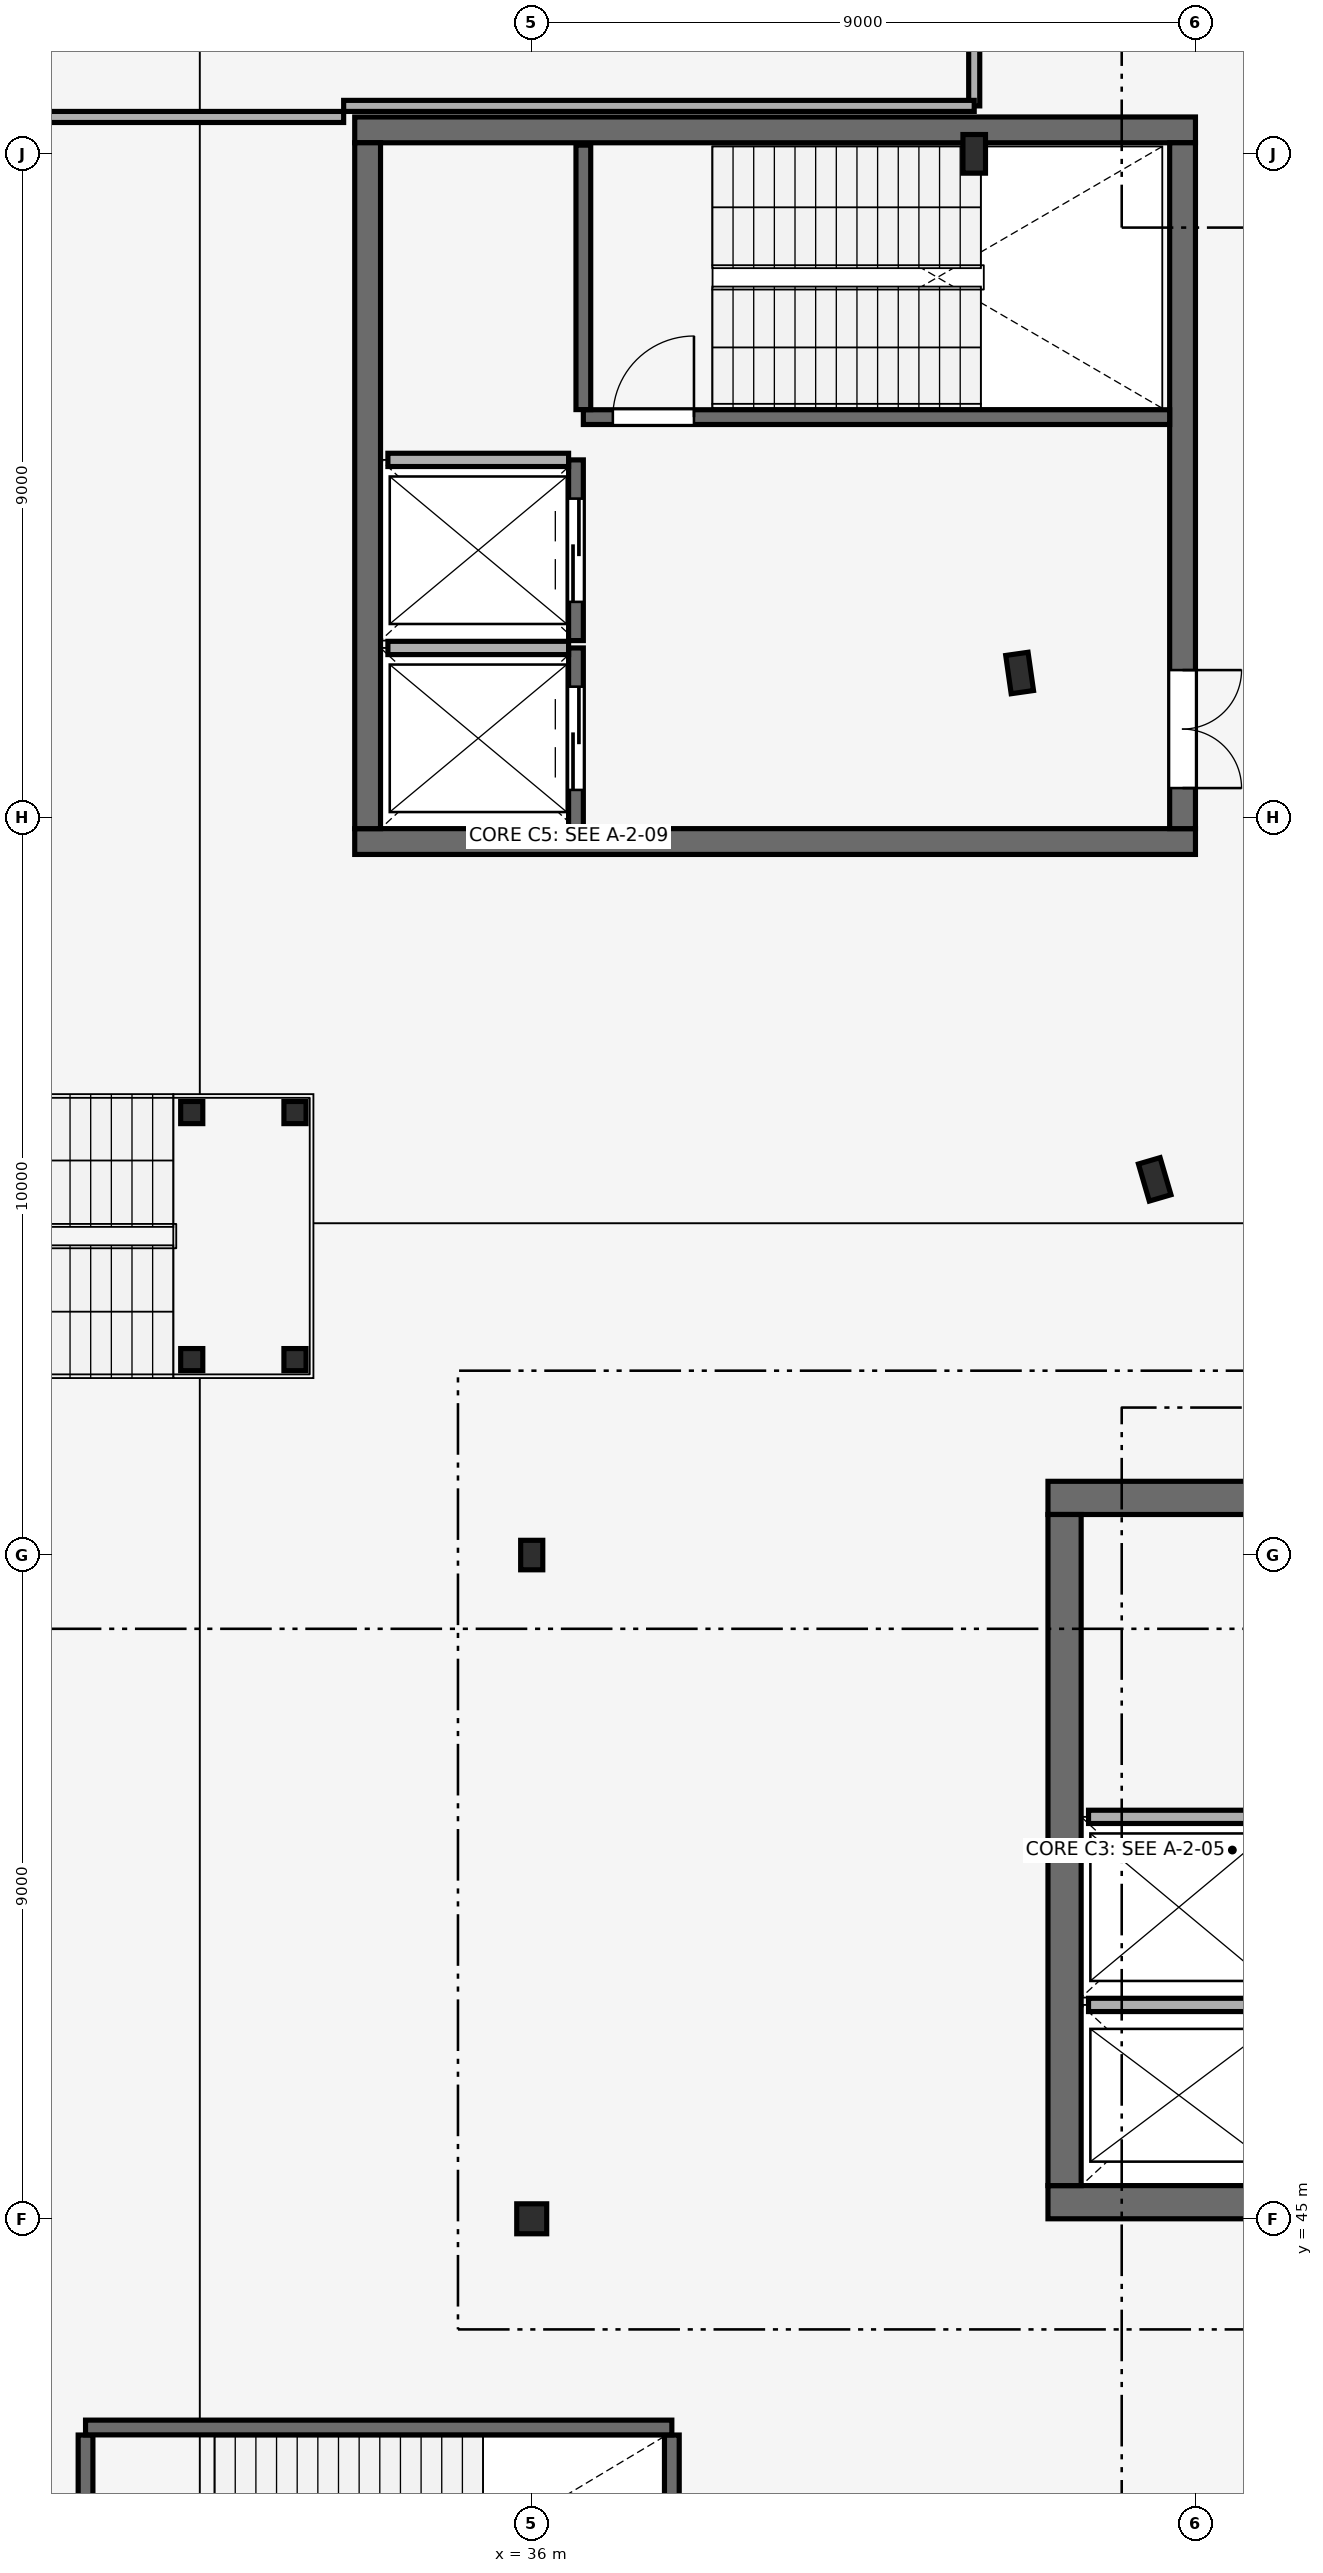
"""IFC4 building model, lengths in metres.
Left out: names, types, materials, properties, quantities, classifications, styles, units other than length and angle.
Written with IfcOpenShell. Run it as: python <this file> out.ifc"""

import sys

from ifc_helpers import new_model, si_unit, direction, frame, frame_2d, origin, origin_2d, place, context, subcontext, project, spatial, rectangle, hollow_rectangle, hollow_circle, i_section, extrude, element, fill, save


model = new_model("IFC4")
c1 = context("Model", 3, precision=1e-05, world=origin(), true_north=direction((0.0, 1.0)))
c2 = subcontext(c1, "Body", "Model", "MODEL_VIEW")
j1 = project(units=[si_unit("LENGTHUNIT", "METRE"), si_unit("PLANEANGLEUNIT", "RADIAN")], contexts=[c1])
p1 = place(None, origin())
s1 = spatial("IfcSite", under=j1, at=p1, CompositionType="ELEMENT")
p2 = place(p1, origin())
s2 = spatial("IfcBuilding", under=s1, at=p2, CompositionType="ELEMENT")
p3 = place(p2, frame((0.0, 0.0, 10.2)))
s3 = spatial("IfcBuildingStorey", under=s2, at=p3, CompositionType="ELEMENT", Elevation=10.2)
for number, where, z_axis, x_axis in (
    (1, (42.0, 73.0, 0.0), (0.0, 0.0, 1.0), (-1.0, 0.0, 0.0)),
    (2, (42.615, 65.96, 0.0), (0.0, 0.0, 1.0), (-0.99, -0.141, 0.0)),
    (3, (44.447, 59.094, 0.0), (0.0, 0.0, 1.0), (-0.96, -0.281, 0.0)),
):
    element("IfcColumn", number, at=place(p3, frame(where, z_axis=z_axis, x_axis=x_axis)), inside=s3, PredefinedType="COLUMN", context=c2, shape_type="SweptSolid", body=[
        extrude(i_section(OverallWidth=0.306, OverallDepth=0.524, WebThickness=0.021, FlangeThickness=0.04, FilletRadius=0.027, at=origin_2d()), origin(), (0.0, 0.0, 1.0), 4.8),
    ])
p4 = place(p3, frame((36.0, 45.0, 0.0), z_axis=(0.0, 0.0, 1.0), x_axis=(1.0, 0.0, 0.0)))
e4 = element("IfcColumn", 4, at=p4, inside=s3, PredefinedType="COLUMN", context=c2, shape_type="SweptSolid", body=[
    extrude(hollow_circle(Radius=0.203, WallThickness=0.016, at=origin_2d()), origin(), (0.0, 0.0, 1.0), 4.8),
])
p5 = place(p3, frame((36.0, 54.0, 0.0), z_axis=(0.0, 0.0, 1.0), x_axis=(1.0, 0.0, 0.0)))
e5 = element("IfcColumn", 5, at=p5, inside=s3, PredefinedType="COLUMN", context=c2, shape_type="SweptSolid", body=[
    extrude(i_section(OverallWidth=0.3, OverallDepth=0.4, WebThickness=0.013, FlangeThickness=0.024, FilletRadius=0.027, at=origin_2d()), origin(), (0.0, 0.0, 1.0), 4.8),
])
for number, where, z_axis, x_axis in (
    (6, (43.0, 45.225, 0.0), (0.0, 0.0, 1.0), (1.0, 0.0, 0.0)),
    (7, (43.0, 54.775, 0.0), (0.0, 0.0, 1.0), (1.0, 0.0, 0.0)),
):
    element("IfcWall", number, at=place(p3, frame(where, z_axis=z_axis, x_axis=x_axis)), inside=s3, PredefinedType="SHEAR", context=c2, shape_type="SweptSolid", body=[
        extrude(rectangle(XDim=11.4, YDim=0.45, at=frame_2d((5.7, 0.0))), origin(), (0.0, 0.0, 1.0), 4.8),
    ])
p6 = place(p3, frame((43.225, 45.45, 0.0), z_axis=(0.0, 0.0, 1.0), x_axis=(0.0, 1.0, 0.0)))
e8 = element("IfcWall", 8, at=p6, inside=s3, PredefinedType="SHEAR", context=c2, shape_type="SweptSolid", body=[
    extrude(rectangle(XDim=9.1, YDim=0.45, at=frame_2d((4.55, 0.0))), origin(), (0.0, 0.0, 1.0), 4.8),
])
for number, where, z_axis, x_axis in (
    (9, (33.6, 63.675, 0.0), (0.0, 0.0, 1.0), (1.0, 0.0, 0.0)),
    (10, (33.6, 73.325, 0.0), (0.0, 0.0, 1.0), (1.0, 0.0, 0.0)),
):
    element("IfcWall", number, at=place(p3, frame(where, z_axis=z_axis, x_axis=x_axis)), inside=s3, PredefinedType="SHEAR", context=c2, shape_type="SweptSolid", body=[
        extrude(rectangle(XDim=11.4, YDim=0.35, at=frame_2d((5.7, 0.0))), origin(), (0.0, 0.0, 1.0), 4.8),
    ])
p7 = place(p3, frame((33.775, 63.85, 0.0), z_axis=(0.0, 0.0, 1.0), x_axis=(0.0, 1.0, 0.0)))
e11 = element("IfcWall", 11, at=p7, inside=s3, PredefinedType="SHEAR", context=c2, shape_type="SweptSolid", body=[
    extrude(rectangle(XDim=9.3, YDim=0.35, at=frame_2d((4.65, 0.0))), origin(), (0.0, 0.0, 1.0), 4.8),
])
p8 = place(p3, frame((44.825, 63.85, 0.0), z_axis=(0.0, 0.0, 1.0), x_axis=(0.0, 1.0, 0.0)))
e12 = element("IfcWall", 12, at=p8, inside=s3, PredefinedType="SHEAR", context=c2, shape_type="SweptSolid", body=[
    extrude(rectangle(XDim=9.3, YDim=0.35, at=frame_2d((4.65, 0.0))), origin(), (0.0, 0.0, 1.0), 4.8),
])
p9 = place(p8, frame((0.55, 0.0, 0.0)))
e13 = element("IfcOpeningElement", 13, at=p9, cuts=e12, PredefinedType="OPENING", context=c2, shape_type="SweptSolid", body=[
    extrude(rectangle(XDim=1.6, YDim=2.2, at=frame_2d((0.8, 1.1))), frame((0.0, 0.185, 0.0), z_axis=(0.0, -1.0, 0.0), x_axis=(1.0, 0.0, 0.0)), (0.0, 0.0, 1.0), 0.37),
])
for number, where, z_axis, x_axis in (
    (14, (43.55, 47.9, 0.0), (0.0, 0.0, 1.0), (1.0, 0.0, 0.0)),
    (15, (43.55, 50.45, 0.0), (0.0, 0.0, 1.0), (1.0, 0.0, 0.0)),
):
    element("IfcWall", number, at=place(p3, frame(where, z_axis=z_axis, x_axis=x_axis)), inside=s3, PredefinedType="PARTITIONING", context=c2, shape_type="SweptSolid", body=[
        extrude(rectangle(XDim=2.45, YDim=0.18, at=frame_2d((1.225, 0.0))), origin(), (0.0, 0.0, 1.0), 4.8),
    ])
p10 = place(p3, frame((36.6, 63.85, 0.0), z_axis=(0.0, 0.0, 1.0), x_axis=(0.0, 1.0, 0.0)))
e16 = element("IfcWall", 16, at=p10, inside=s3, PredefinedType="SHEAR", context=c2, shape_type="SweptSolid", body=[
    extrude(rectangle(XDim=2.45, YDim=0.2, at=frame_2d((1.225, 0.0))), origin(), (0.0, 0.0, 1.0), 4.52),
])
p11 = place(p10, frame((0.525, 0.0, 0.0)))
e17 = element("IfcOpeningElement", 17, at=p11, cuts=e16, PredefinedType="OPENING", context=c2, shape_type="SweptSolid", body=[
    extrude(rectangle(XDim=1.4, YDim=2.2, at=frame_2d((0.7, 1.1))), frame((0.0, 0.11, 0.0), z_axis=(0.0, -1.0, 0.0), x_axis=(1.0, 0.0, 0.0)), (0.0, 0.0, 1.0), 0.22),
])
p12 = place(p3, frame((34.05, 66.3, 0.0), z_axis=(0.0, 0.0, 1.0), x_axis=(1.0, 0.0, 0.0)))
e18 = element("IfcWall", 18, at=p12, inside=s3, PredefinedType="PARTITIONING", context=c2, shape_type="SweptSolid", body=[
    extrude(rectangle(XDim=2.45, YDim=0.18, at=frame_2d((1.225, 0.0))), origin(), (0.0, 0.0, 1.0), 4.8),
])
p13 = place(p3, frame((36.6, 66.4, 0.0), z_axis=(0.0, 0.0, 1.0), x_axis=(0.0, 1.0, 0.0)))
e19 = element("IfcWall", 19, at=p13, inside=s3, PredefinedType="SHEAR", context=c2, shape_type="SweptSolid", body=[
    extrude(rectangle(XDim=2.45, YDim=0.2, at=frame_2d((1.225, 0.0))), origin(), (0.0, 0.0, 1.0), 4.52),
])
p14 = place(p13, frame((0.525, 0.0, 0.0)))
e20 = element("IfcOpeningElement", 20, at=p14, cuts=e19, PredefinedType="OPENING", context=c2, shape_type="SweptSolid", body=[
    extrude(rectangle(XDim=1.4, YDim=2.2, at=frame_2d((0.7, 1.1))), frame((0.0, 0.11, 0.0), z_axis=(0.0, -1.0, 0.0), x_axis=(1.0, 0.0, 0.0)), (0.0, 0.0, 1.0), 0.22),
])
p15 = place(p3, frame((34.05, 68.85, 0.0), z_axis=(0.0, 0.0, 1.0), x_axis=(1.0, 0.0, 0.0)))
e21 = element("IfcWall", 21, at=p15, inside=s3, PredefinedType="PARTITIONING", context=c2, shape_type="SweptSolid", body=[
    extrude(rectangle(XDim=2.45, YDim=0.18, at=frame_2d((1.225, 0.0))), origin(), (0.0, 0.0, 1.0), 4.8),
])
p16 = place(p3, frame((36.7, 69.43, 0.0), z_axis=(0.0, 0.0, 1.0), x_axis=(1.0, 0.0, 0.0)))
e22 = element("IfcWall", 22, at=p16, inside=s3, PredefinedType="SHEAR", context=c2, shape_type="SweptSolid", body=[
    extrude(rectangle(XDim=7.95, YDim=0.2, at=frame_2d((3.975, 0.0))), origin(), (0.0, 0.0, 1.0), 4.8),
])
p17 = place(p16, frame((0.4, 0.0, 0.0)))
e23 = element("IfcOpeningElement", 23, at=p17, cuts=e22, PredefinedType="OPENING", context=c2, shape_type="SweptSolid", body=[
    extrude(rectangle(XDim=1.1, YDim=2.15, at=frame_2d((0.55, 1.075))), frame((0.0, 0.11, 0.0), z_axis=(0.0, -1.0, 0.0), x_axis=(1.0, 0.0, 0.0)), (0.0, 0.0, 1.0), 0.22),
])
p18 = place(p3, frame((36.7, 69.532, 0.0), z_axis=(0.0, 0.0, 1.0), x_axis=(0.0, 1.0, 0.0)))
e24 = element("IfcWall", 24, at=p18, inside=s3, PredefinedType="SHEAR", context=c2, shape_type="SweptSolid", body=[
    extrude(rectangle(XDim=3.586, YDim=0.2, at=frame_2d((1.793, 0.0))), origin(), (0.0, 0.0, 1.0), 4.8),
])
p19 = place(p3, frame((29.95, 38.382, 0.0), z_axis=(0.0, 0.0, 1.0), x_axis=(0.0, 1.0, 0.0)))
e25 = element("IfcWall", 25, at=p19, inside=s3, PredefinedType="SHEAR", context=c2, shape_type="SweptSolid", body=[
    extrude(rectangle(XDim=3.686, YDim=0.2, at=frame_2d((1.843, 0.0))), origin(), (0.0, 0.0, 1.0), 4.8),
])
p20 = place(p19, frame((1.293, 0.0, 0.0)))
e26 = element("IfcOpeningElement", 26, at=p20, cuts=e25, PredefinedType="OPENING", context=c2, shape_type="SweptSolid", body=[
    extrude(rectangle(XDim=1.1, YDim=2.15, at=frame_2d((0.55, 1.075))), frame((0.0, 0.11, 0.0), z_axis=(0.0, -1.0, 0.0), x_axis=(1.0, 0.0, 0.0)), (0.0, 0.0, 1.0), 0.22),
])
p21 = place(p3, frame((37.9, 38.382, 0.0), z_axis=(0.0, 0.0, 1.0), x_axis=(0.0, 1.0, 0.0)))
e27 = element("IfcWall", 27, at=p21, inside=s3, PredefinedType="SHEAR", context=c2, shape_type="SweptSolid", body=[
    extrude(rectangle(XDim=3.686, YDim=0.2, at=frame_2d((1.843, 0.0))), origin(), (0.0, 0.0, 1.0), 4.8),
])
p22 = place(p3, frame((29.95, 42.17, 0.0), z_axis=(0.0, 0.0, 1.0), x_axis=(1.0, 0.0, 0.0)))
e28 = element("IfcWall", 28, at=p22, inside=s3, PredefinedType="SHEAR", context=c2, shape_type="SweptSolid", body=[
    extrude(rectangle(XDim=7.95, YDim=0.2, at=frame_2d((3.975, 0.0))), origin(), (0.0, 0.0, 1.0), 4.8),
])
for number, where, z_axis, x_axis in (
    (29, (31.39, 56.65, 0.0), (0.0, 0.0, 1.0), (1.0, 0.0, 0.0)),
    (30, (31.39, 60.0, 0.0), (0.0, 0.0, 1.0), (1.0, 0.0, 0.0)),
    (31, (32.79, 56.65, 0.0), (0.0, 0.0, 1.0), (1.0, 0.0, 0.0)),
    (32, (32.79, 60.0, 0.0), (0.0, 0.0, 1.0), (1.0, 0.0, 0.0)),
):
    element("IfcColumn", number, at=place(p3, frame(where, z_axis=z_axis, x_axis=x_axis)), inside=s3, PredefinedType="COLUMN", context=c2, shape_type="SweptSolid", body=[
        extrude(hollow_rectangle(XDim=0.3, YDim=0.3, WallThickness=0.012, at=origin_2d()), origin(), (0.0, 0.0, 1.0), 2.18),
    ])
p23 = place(p3, frame((33.45, 73.5, 0.0), z_axis=(0.0, 0.0, 1.0), x_axis=(-1.0, 0.0, 0.0)))
e33 = element("IfcWall", 33, at=p23, inside=s3, PredefinedType="PARTITIONING", context=c2, shape_type="SweptSolid", body=[
    extrude(rectangle(XDim=9.45, YDim=0.15, at=frame_2d((4.725, 0.0))), origin(), (0.0, 0.0, 1.0), 4.52),
])
p24 = place(p3, frame((42.0, 83.05, 0.0), z_axis=(0.0, 0.0, 1.0), x_axis=(0.0, -1.0, 0.0)))
e34 = element("IfcWall", 34, at=p24, inside=s3, PredefinedType="PARTITIONING", context=c2, shape_type="SweptSolid", body=[
    extrude(rectangle(XDim=9.4, YDim=0.15, at=frame_2d((4.7, 0.0))), origin(), (0.0, 0.0, 1.0), 3.832),
])
p25 = place(p3, frame((42.0, 73.65, 0.0), z_axis=(0.0, 0.0, 1.0), x_axis=(-1.0, 0.0, 0.0)))
e35 = element("IfcWall", 35, at=p25, inside=s3, PredefinedType="PARTITIONING", context=c2, shape_type="SweptSolid", body=[
    extrude(rectangle(XDim=8.55, YDim=0.15, at=frame_2d((4.275, 0.0))), origin(), (0.0, 0.0, 1.0), 4.52),
])
p26 = place(p11, origin())
e36 = element("IfcDoor", 36, at=p26, inside=s3, OperationType="DOUBLE_DOOR_SLIDING", PredefinedType="DOOR", context=c2, shape_type="SweptSolid", body=[
    extrude(rectangle(XDim=1.4, YDim=2.2, at=frame_2d((0.7, 1.1))), frame((0.0, 0.025, 0.0), z_axis=(0.0, -1.0, 0.0), x_axis=(1.0, 0.0, 0.0)), (0.0, 0.0, 1.0), 0.05),
])
fill(e17, e36)
p27 = place(p14, origin())
e37 = element("IfcDoor", 37, at=p27, inside=s3, OperationType="DOUBLE_DOOR_SLIDING", PredefinedType="DOOR", context=c2, shape_type="SweptSolid", body=[
    extrude(rectangle(XDim=1.4, YDim=2.2, at=frame_2d((0.7, 1.1))), frame((0.0, 0.025, 0.0), z_axis=(0.0, -1.0, 0.0), x_axis=(1.0, 0.0, 0.0)), (0.0, 0.0, 1.0), 0.05),
])
fill(e20, e37)
p28 = place(p17, frame((1.1, 0.0, 0.0), z_axis=(0.0, 0.0, 1.0), x_axis=(-1.0, 0.0, 0.0)))
e38 = element("IfcDoor", 38, at=p28, inside=s3, OperationType="SINGLE_SWING_LEFT", PredefinedType="DOOR", context=c2, shape_type="SweptSolid", body=[
    extrude(rectangle(XDim=1.1, YDim=2.15, at=frame_2d((0.55, 1.075))), frame((0.0, 0.025, 0.0), z_axis=(0.0, -1.0, 0.0), x_axis=(1.0, 0.0, 0.0)), (0.0, 0.0, 1.0), 0.05),
])
fill(e23, e38)
p29 = place(p9, frame((1.6, 0.0, 0.0), z_axis=(0.0, 0.0, 1.0), x_axis=(-1.0, 0.0, 0.0)))
e39 = element("IfcDoor", 39, at=p29, inside=s3, OperationType="DOUBLE_DOOR_SINGLE_SWING", PredefinedType="DOOR", context=c2, shape_type="SweptSolid", body=[
    extrude(rectangle(XDim=1.6, YDim=2.2, at=frame_2d((0.8, 1.1))), frame((0.0, 0.025, 0.0), z_axis=(0.0, -1.0, 0.0), x_axis=(1.0, 0.0, 0.0)), (0.0, 0.0, 1.0), 0.05),
])
fill(e13, e39)
save(model, sys.argv[1])
